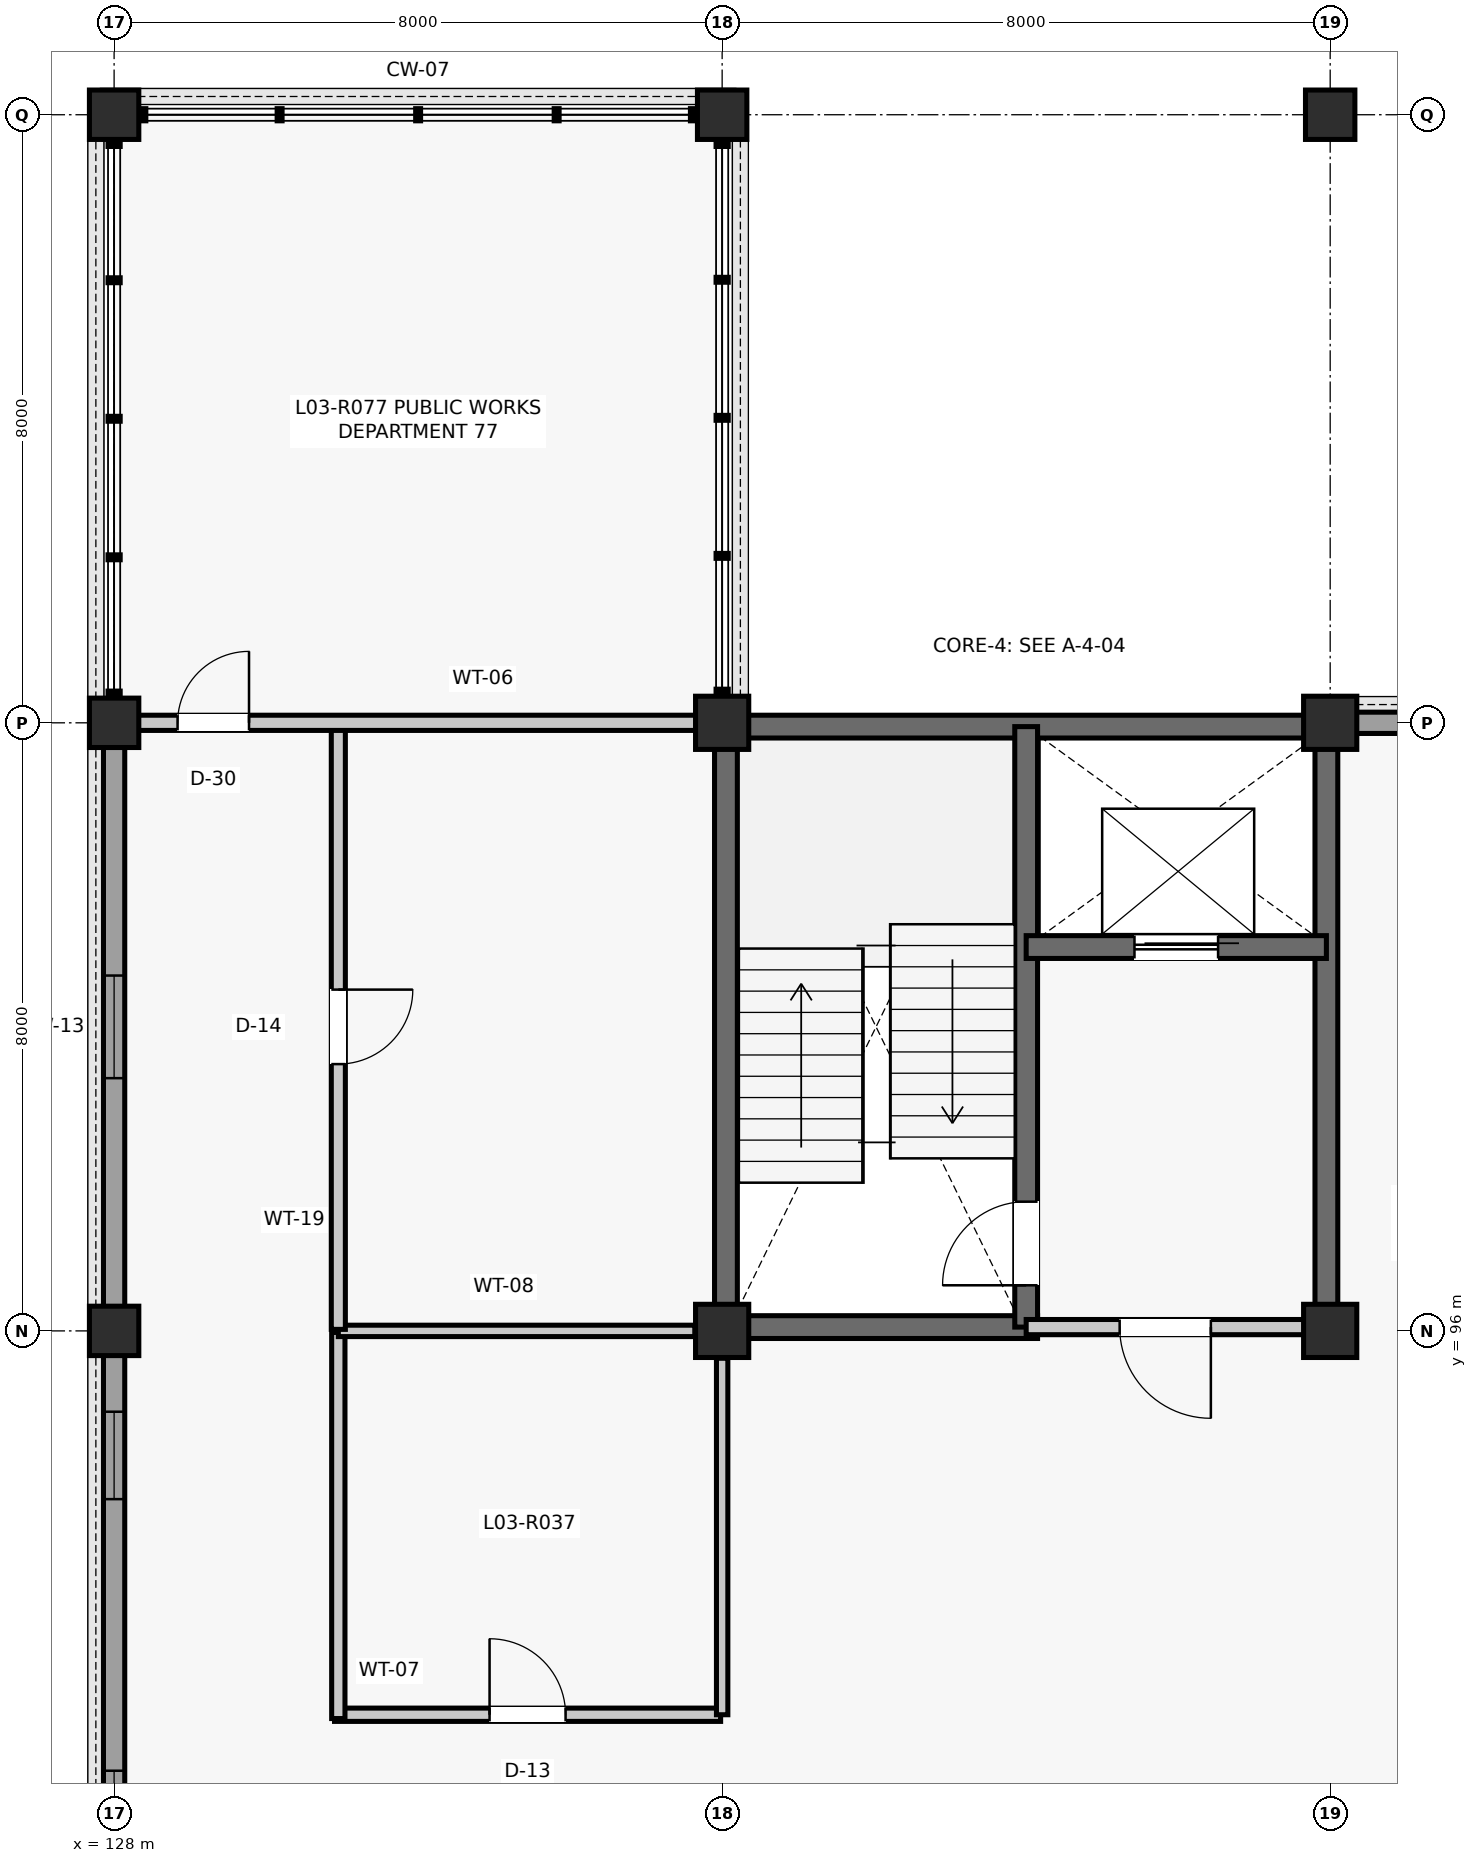
"""IFC4 building model, lengths in metres.
Left out: names, types, materials, properties, quantities, classifications, styles, units other than length and angle.
Written with IfcOpenShell. Run it as: python <this file> out.ifc"""

import sys

from ifc_helpers import new_model, si_unit, direction, frame, frame_2d, origin, origin_2d, place, context, subcontext, project, spatial, rectangle, extrude, element, fill, save


model = new_model("IFC4")
c1 = context("Model", 3, precision=1e-05, world=origin(), true_north=direction((0.0, 1.0)))
c2 = subcontext(c1, "Body", "Model", "MODEL_VIEW")
j1 = project(units=[si_unit("LENGTHUNIT", "METRE"), si_unit("PLANEANGLEUNIT", "RADIAN")], contexts=[c1])
p1 = place(None, origin())
s1 = spatial("IfcSite", under=j1, at=p1, CompositionType="ELEMENT")
p2 = place(p1, origin())
s2 = spatial("IfcBuilding", under=s1, at=p2, CompositionType="ELEMENT")
p3 = place(p2, frame((0.0, 0.0, 13.86)))
s3 = spatial("IfcBuildingStorey", under=s2, at=p3, CompositionType="ELEMENT", Elevation=13.86)
for number, where, z_axis, x_axis in (
    (1, (128.0, 96.0, 0.0), (0.0, 0.0, 1.0), (1.0, 0.0, 0.0)),
    (2, (128.0, 104.0, 0.0), (0.0, 0.0, 1.0), (1.0, 0.0, 0.0)),
    (3, (128.0, 112.0, 0.0), (0.0, 0.0, 1.0), (1.0, 0.0, 0.0)),
):
    element("IfcColumn", number, at=place(p3, frame(where, z_axis=z_axis, x_axis=x_axis)), inside=s3, PredefinedType="COLUMN", context=c2, shape_type="SweptSolid", body=[
        extrude(rectangle(XDim=0.65, YDim=0.65, at=origin_2d()), origin(), (0.0, 0.0, 1.0), 3.96),
    ])
for number, where, z_axis, x_axis in (
    (4, (136.0, 96.0, 0.0), (0.0, 0.0, 1.0), (1.0, 0.0, 0.0)),
    (5, (136.0, 104.0, 0.0), (0.0, 0.0, 1.0), (1.0, 0.0, 0.0)),
):
    element("IfcColumn", number, at=place(p3, frame(where, z_axis=z_axis, x_axis=x_axis)), inside=s3, PredefinedType="COLUMN", context=c2, shape_type="SweptSolid", body=[
        extrude(rectangle(XDim=0.7, YDim=0.7, at=origin_2d()), origin(), (0.0, 0.0, 1.0), 3.96),
    ])
p4 = place(p3, frame((136.0, 112.0, 0.0), z_axis=(0.0, 0.0, 1.0), x_axis=(1.0, 0.0, 0.0)))
e6 = element("IfcColumn", 6, at=p4, inside=s3, PredefinedType="COLUMN", context=c2, shape_type="SweptSolid", body=[
    extrude(rectangle(XDim=0.65, YDim=0.65, at=origin_2d()), origin(), (0.0, 0.0, 1.0), 3.96),
])
for number, where, z_axis, x_axis in (
    (7, (144.0, 96.0, 0.0), (0.0, 0.0, 1.0), (1.0, 0.0, 0.0)),
    (8, (144.0, 104.0, 0.0), (0.0, 0.0, 1.0), (1.0, 0.0, 0.0)),
):
    element("IfcColumn", number, at=place(p3, frame(where, z_axis=z_axis, x_axis=x_axis)), inside=s3, PredefinedType="COLUMN", context=c2, shape_type="SweptSolid", body=[
        extrude(rectangle(XDim=0.7, YDim=0.7, at=origin_2d()), origin(), (0.0, 0.0, 1.0), 3.96),
    ])
p5 = place(p3, frame((144.0, 112.0, 0.0), z_axis=(0.0, 0.0, 1.0), x_axis=(1.0, 0.0, 0.0)))
e9 = element("IfcColumn", 9, at=p5, inside=s3, PredefinedType="COLUMN", context=c2, shape_type="SweptSolid", body=[
    extrude(rectangle(XDim=0.65, YDim=0.65, at=origin_2d()), origin(), (0.0, 0.0, 1.0), 3.96),
])
p6 = place(p3, frame((128.0, 88.31, 0.0), z_axis=(0.0, 0.0, 1.0), x_axis=(0.0, 1.0, 0.0)))
e10 = element("IfcWall", 10, at=p6, inside=s3, PredefinedType="SOLIDWALL", context=c2, shape_type="SweptSolid", body=[
    extrude(rectangle(XDim=7.38, YDim=0.28, at=frame_2d((3.69, 0.0))), origin(), (0.0, 0.0, 1.0), 3.304),
])
p7 = place(p6, frame((0.753, 0.0, 0.95)))
e11 = element("IfcOpeningElement", 11, at=p7, cuts=e10, PredefinedType="OPENING", context=c2, shape_type="SweptSolid", body=[
    extrude(rectangle(XDim=1.15, YDim=1.65, at=frame_2d((0.575, 0.825))), frame((0.0, 0.15, 0.0), z_axis=(0.0, -1.0, 0.0), x_axis=(1.0, 0.0, 0.0)), (0.0, 0.0, 1.0), 0.3),
])
p8 = place(p6, frame((5.477, 0.0, 0.95)))
e12 = element("IfcOpeningElement", 12, at=p8, cuts=e10, PredefinedType="OPENING", context=c2, shape_type="SweptSolid", body=[
    extrude(rectangle(XDim=1.15, YDim=1.65, at=frame_2d((0.575, 0.825))), frame((0.0, 0.15, 0.0), z_axis=(0.0, -1.0, 0.0), x_axis=(1.0, 0.0, 0.0)), (0.0, 0.0, 1.0), 0.3),
])
p9 = place(p3, frame((128.0, 96.31, 0.0), z_axis=(0.0, 0.0, 1.0), x_axis=(0.0, 1.0, 0.0)))
e13 = element("IfcWall", 13, at=p9, inside=s3, PredefinedType="SOLIDWALL", context=c2, shape_type="SweptSolid", body=[
    extrude(rectangle(XDim=7.38, YDim=0.28, at=frame_2d((3.69, 0.0))), origin(), (0.0, 0.0, 1.0), 3.367),
])
p10 = place(p9, frame((3.015, 0.0, 0.9)))
e14 = element("IfcOpeningElement", 14, at=p10, cuts=e13, PredefinedType="OPENING", context=c2, shape_type="SweptSolid", body=[
    extrude(rectangle(XDim=1.35, YDim=1.9, at=frame_2d((0.675, 0.95))), frame((0.0, 0.15, 0.0), z_axis=(0.0, -1.0, 0.0), x_axis=(1.0, 0.0, 0.0)), (0.0, 0.0, 1.0), 0.3),
])
p11 = place(p3, frame((144.335, 104.0, 0.0), z_axis=(0.0, 0.0, 1.0), x_axis=(1.0, 0.0, 0.0)))
e15 = element("IfcWall", 15, at=p11, inside=s3, PredefinedType="SOLIDWALL", context=c2, shape_type="SweptSolid", body=[
    extrude(rectangle(XDim=7.355, YDim=0.28, at=frame_2d((3.677, 0.0))), origin(), (0.0, 0.0, 1.0), 3.304),
])
p12 = place(p11, frame((0.684, 0.0, 0.95)))
e16 = element("IfcOpeningElement", 16, at=p12, cuts=e15, PredefinedType="OPENING", context=c2, shape_type="SweptSolid", body=[
    extrude(rectangle(XDim=1.28, YDim=1.72, at=frame_2d((0.64, 0.86))), frame((0.0, 0.15, 0.0), z_axis=(0.0, -1.0, 0.0), x_axis=(1.0, 0.0, 0.0)), (0.0, 0.0, 1.0), 0.3),
])
p13 = place(p11, frame((5.391, 0.0, 0.95)))
e17 = element("IfcOpeningElement", 17, at=p13, cuts=e15, PredefinedType="OPENING", context=c2, shape_type="SweptSolid", body=[
    extrude(rectangle(XDim=1.28, YDim=1.72, at=frame_2d((0.64, 0.86))), frame((0.0, 0.15, 0.0), z_axis=(0.0, -1.0, 0.0), x_axis=(1.0, 0.0, 0.0)), (0.0, 0.0, 1.0), 0.3),
])
for number, where, z_axis, x_axis in (
    (18, (136.05, 96.24, 0.0), (0.0, 0.0, 1.0), (0.0, 1.0, 0.0)),
    (19, (136.24, 103.95, 0.0), (0.0, 0.0, 1.0), (1.0, 0.0, 0.0)),
    (20, (143.95, 96.24, 0.0), (0.0, 0.0, 1.0), (0.0, 1.0, 0.0)),
):
    element("IfcWall", number, at=place(p3, frame(where, z_axis=z_axis, x_axis=x_axis)), inside=s3, PredefinedType="SHEAR", context=c2, shape_type="SweptSolid", body=[
        extrude(rectangle(XDim=7.52, YDim=0.3, at=frame_2d((3.76, 0.0))), origin(), (0.0, 0.0, 1.0), 3.725),
    ])
p14 = place(p3, frame((136.24, 96.05, 0.0), z_axis=(0.0, 0.0, 1.0), x_axis=(1.0, 0.0, 0.0)))
e21 = element("IfcWall", 21, at=p14, inside=s3, PredefinedType="SHEAR", context=c2, shape_type="SweptSolid", body=[
    extrude(rectangle(XDim=3.91, YDim=0.3, at=frame_2d((1.955, 0.0))), origin(), (0.0, 0.0, 1.0), 3.725),
])
p15 = place(p3, frame((140.0, 96.05, 0.0), z_axis=(0.0, 0.0, 1.0), x_axis=(0.0, 1.0, 0.0)))
e22 = element("IfcWall", 22, at=p15, inside=s3, PredefinedType="SHEAR", context=c2, shape_type="SweptSolid", body=[
    extrude(rectangle(XDim=7.9, YDim=0.3, at=frame_2d((3.95, 0.0))), origin(), (0.0, 0.0, 1.0), 3.725),
])
p16 = place(p15, frame((0.55, 0.0, 0.0)))
e23 = element("IfcOpeningElement", 23, at=p16, cuts=e22, PredefinedType="OPENING", context=c2, shape_type="SweptSolid", body=[
    extrude(rectangle(XDim=1.1, YDim=2.15, at=frame_2d((0.55, 1.075))), frame((0.0, 0.16, 0.0), z_axis=(0.0, -1.0, 0.0), x_axis=(1.0, 0.0, 0.0)), (0.0, 0.0, 1.0), 0.32),
])
p17 = place(p3, frame((140.0, 101.05, 0.0), z_axis=(0.0, 0.0, 1.0), x_axis=(1.0, 0.0, 0.0)))
e24 = element("IfcWall", 24, at=p17, inside=s3, PredefinedType="SHEAR", context=c2, shape_type="SweptSolid", body=[
    extrude(rectangle(XDim=3.95, YDim=0.3, at=frame_2d((1.975, 0.0))), origin(), (0.0, 0.0, 1.0), 3.725),
])
p18 = place(p17, frame((1.425, 0.0, 0.0)))
e25 = element("IfcOpeningElement", 25, at=p18, cuts=e24, PredefinedType="OPENING", context=c2, shape_type="SweptSolid", body=[
    extrude(rectangle(XDim=1.1, YDim=2.2, at=frame_2d((0.55, 1.1))), frame((0.0, 0.16, 0.0), z_axis=(0.0, -1.0, 0.0), x_axis=(1.0, 0.0, 0.0)), (0.0, 0.0, 1.0), 0.32),
])
p19 = place(p3, frame((140.0, 96.05, 0.0), z_axis=(0.0, 0.0, 1.0), x_axis=(1.0, 0.0, 0.0)))
e26 = element("IfcWall", 26, at=p19, inside=s3, PredefinedType="PARTITIONING", context=c2, shape_type="SweptSolid", body=[
    extrude(rectangle(XDim=3.66, YDim=0.2, at=frame_2d((1.83, 0.0))), origin(), (0.0, 0.0, 1.0), 3.253),
])
p20 = place(p19, frame((1.23, 0.0, 0.0)))
e27 = element("IfcOpeningElement", 27, at=p20, cuts=e26, PredefinedType="OPENING", context=c2, shape_type="SweptSolid", body=[
    extrude(rectangle(XDim=1.2, YDim=2.15, at=frame_2d((0.6, 1.075))), frame((0.0, 0.11, 0.0), z_axis=(0.0, -1.0, 0.0), x_axis=(1.0, 0.0, 0.0)), (0.0, 0.0, 1.0), 0.22),
])
p21 = place(p3, frame((130.9, 90.95, 0.0), z_axis=(0.0, 0.0, 1.0), x_axis=(1.0, 0.0, 0.0)))
e28 = element("IfcWall", 28, at=p21, inside=s3, PredefinedType="PARTITIONING", context=c2, shape_type="SweptSolid", body=[
    extrude(rectangle(XDim=5.08, YDim=0.175, at=frame_2d((2.54, 0.0))), origin(), (0.0, 0.0, 1.0), 3.253),
])
p22 = place(p21, frame((2.04, 0.0, 0.0)))
e29 = element("IfcOpeningElement", 29, at=p22, cuts=e28, PredefinedType="OPENING", context=c2, shape_type="SweptSolid", body=[
    extrude(rectangle(XDim=1.0, YDim=2.15, at=frame_2d((0.5, 1.075))), frame((0.0, 0.097, 0.0), z_axis=(0.0, -1.0, 0.0), x_axis=(1.0, 0.0, 0.0)), (0.0, 0.0, 1.0), 0.195),
])
p23 = place(p3, frame((130.95, 90.9, 0.0), z_axis=(0.0, 0.0, 1.0), x_axis=(0.0, 1.0, 0.0)))
e30 = element("IfcWall", 30, at=p23, inside=s3, PredefinedType="PARTITIONING", context=c2, shape_type="SweptSolid", body=[
    extrude(rectangle(XDim=5.08, YDim=0.175, at=frame_2d((2.54, 0.0))), origin(), (0.0, 0.0, 1.0), 3.247),
])
p24 = place(p3, frame((130.95, 96.0, 0.0), z_axis=(0.0, 0.0, 1.0), x_axis=(1.0, 0.0, 0.0)))
e31 = element("IfcWall", 31, at=p24, inside=s3, PredefinedType="PARTITIONING", context=c2, shape_type="SweptSolid", body=[
    extrude(rectangle(XDim=4.69, YDim=0.15, at=frame_2d((2.345, 0.0))), origin(), (0.0, 0.0, 1.0), 3.247),
])
p25 = place(p3, frame((136.0, 90.95, 0.0), z_axis=(0.0, 0.0, 1.0), x_axis=(0.0, 1.0, 0.0)))
e32 = element("IfcWall", 32, at=p25, inside=s3, PredefinedType="PARTITIONING", context=c2, shape_type="SweptSolid", body=[
    extrude(rectangle(XDim=4.69, YDim=0.15, at=frame_2d((2.345, 0.0))), origin(), (0.0, 0.0, 1.0), 3.253),
])
p26 = place(p3, frame((130.95, 96.02, 0.0), z_axis=(0.0, 0.0, 1.0), x_axis=(0.0, 1.0, 0.0)))
e33 = element("IfcWall", 33, at=p26, inside=s3, PredefinedType="PARTITIONING", context=c2, shape_type="SweptSolid", body=[
    extrude(rectangle(XDim=7.96, YDim=0.185, at=frame_2d((3.98, 0.0))), origin(), (0.0, 0.0, 1.0), 3.247),
])
p27 = place(p26, frame((3.49, 0.0, 0.0)))
e34 = element("IfcOpeningElement", 34, at=p27, cuts=e33, PredefinedType="OPENING", context=c2, shape_type="SweptSolid", body=[
    extrude(rectangle(XDim=0.98, YDim=2.15, at=frame_2d((0.49, 1.075))), frame((0.0, 0.103, 0.0), z_axis=(0.0, -1.0, 0.0), x_axis=(1.0, 0.0, 0.0)), (0.0, 0.0, 1.0), 0.205),
])
p28 = place(p3, frame((128.315, 104.0, 0.0), z_axis=(0.0, 0.0, 1.0), x_axis=(1.0, 0.0, 0.0)))
e35 = element("IfcWall", 35, at=p28, inside=s3, PredefinedType="PARTITIONING", context=c2, shape_type="SweptSolid", body=[
    extrude(rectangle(XDim=7.345, YDim=0.2, at=frame_2d((3.672, 0.0))), origin(), (0.0, 0.0, 1.0), 3.253),
])
p29 = place(p28, frame((0.52, 0.0, 0.0)))
e36 = element("IfcOpeningElement", 36, at=p29, cuts=e35, PredefinedType="OPENING", context=c2, shape_type="SweptSolid", body=[
    extrude(rectangle(XDim=0.94, YDim=2.12, at=frame_2d((0.47, 1.06))), frame((0.0, 0.11, 0.0), z_axis=(0.0, -1.0, 0.0), x_axis=(1.0, 0.0, 0.0)), (0.0, 0.0, 1.0), 0.22),
])
p30 = place(p7, origin())
e37 = element("IfcWindow", 37, at=p30, inside=s3, PartitioningType="SINGLE_PANEL", PredefinedType="WINDOW", context=c2, shape_type="SweptSolid", body=[
    extrude(rectangle(XDim=1.15, YDim=1.65, at=frame_2d((0.575, 0.825))), frame((0.0, 0.03, 0.0), z_axis=(0.0, -1.0, 0.0), x_axis=(1.0, 0.0, 0.0)), (0.0, 0.0, 1.0), 0.06),
])
fill(e11, e37)
p31 = place(p8, origin())
e38 = element("IfcWindow", 38, at=p31, inside=s3, PartitioningType="SINGLE_PANEL", PredefinedType="WINDOW", context=c2, shape_type="SweptSolid", body=[
    extrude(rectangle(XDim=1.15, YDim=1.65, at=frame_2d((0.575, 0.825))), frame((0.0, 0.03, 0.0), z_axis=(0.0, -1.0, 0.0), x_axis=(1.0, 0.0, 0.0)), (0.0, 0.0, 1.0), 0.06),
])
fill(e12, e38)
p32 = place(p10, origin())
e39 = element("IfcWindow", 39, at=p32, inside=s3, PartitioningType="SINGLE_PANEL", PredefinedType="WINDOW", context=c2, shape_type="SweptSolid", body=[
    extrude(rectangle(XDim=1.35, YDim=1.9, at=frame_2d((0.675, 0.95))), frame((0.0, 0.03, 0.0), z_axis=(0.0, -1.0, 0.0), x_axis=(1.0, 0.0, 0.0)), (0.0, 0.0, 1.0), 0.06),
])
fill(e14, e39)
p33 = place(p16, origin())
e40 = element("IfcDoor", 40, at=p33, inside=s3, OperationType="SINGLE_SWING_LEFT", PredefinedType="DOOR", context=c2, shape_type="SweptSolid", body=[
    extrude(rectangle(XDim=1.1, YDim=2.15, at=frame_2d((0.55, 1.075))), frame((0.0, 0.025, 0.0), z_axis=(0.0, -1.0, 0.0), x_axis=(1.0, 0.0, 0.0)), (0.0, 0.0, 1.0), 0.05),
])
fill(e23, e40)
p34 = place(p18, origin())
e41 = element("IfcDoor", 41, at=p34, inside=s3, OperationType="SLIDING_TO_LEFT", PredefinedType="DOOR", context=c2, shape_type="SweptSolid", body=[
    extrude(rectangle(XDim=1.1, YDim=2.2, at=frame_2d((0.55, 1.1))), frame((0.0, 0.025, 0.0), z_axis=(0.0, -1.0, 0.0), x_axis=(1.0, 0.0, 0.0)), (0.0, 0.0, 1.0), 0.05),
])
fill(e25, e41)
p35 = place(p20, frame((1.2, 0.0, 0.0), z_axis=(0.0, 0.0, 1.0), x_axis=(-1.0, 0.0, 0.0)))
e42 = element("IfcDoor", 42, at=p35, inside=s3, OperationType="SINGLE_SWING_RIGHT", PredefinedType="DOOR", context=c2, shape_type="SweptSolid", body=[
    extrude(rectangle(XDim=1.2, YDim=2.15, at=frame_2d((0.6, 1.075))), frame((0.0, 0.025, 0.0), z_axis=(0.0, -1.0, 0.0), x_axis=(1.0, 0.0, 0.0)), (0.0, 0.0, 1.0), 0.05),
])
fill(e27, e42)
p36 = place(p22, origin())
e43 = element("IfcDoor", 43, at=p36, inside=s3, OperationType="SINGLE_SWING_LEFT", PredefinedType="DOOR", context=c2, shape_type="SweptSolid", body=[
    extrude(rectangle(XDim=1.0, YDim=2.15, at=frame_2d((0.5, 1.075))), frame((0.0, 0.025, 0.0), z_axis=(0.0, -1.0, 0.0), x_axis=(1.0, 0.0, 0.0)), (0.0, 0.0, 1.0), 0.05),
])
fill(e29, e43)
p37 = place(p27, frame((0.98, 0.0, 0.0), z_axis=(0.0, 0.0, 1.0), x_axis=(-1.0, 0.0, 0.0)))
e44 = element("IfcDoor", 44, at=p37, inside=s3, OperationType="SINGLE_SWING_RIGHT", PredefinedType="DOOR", context=c2, shape_type="SweptSolid", body=[
    extrude(rectangle(XDim=0.98, YDim=2.15, at=frame_2d((0.49, 1.075))), frame((0.0, 0.025, 0.0), z_axis=(0.0, -1.0, 0.0), x_axis=(1.0, 0.0, 0.0)), (0.0, 0.0, 1.0), 0.05),
])
fill(e34, e44)
p38 = place(p29, origin())
e45 = element("IfcDoor", 45, at=p38, inside=s3, OperationType="SINGLE_SWING_RIGHT", PredefinedType="DOOR", context=c2, shape_type="SweptSolid", body=[
    extrude(rectangle(XDim=0.94, YDim=2.12, at=frame_2d((0.47, 1.06))), frame((0.0, 0.025, 0.0), z_axis=(0.0, -1.0, 0.0), x_axis=(1.0, 0.0, 0.0)), (0.0, 0.0, 1.0), 0.05),
])
fill(e36, e45)
save(model, sys.argv[1])
